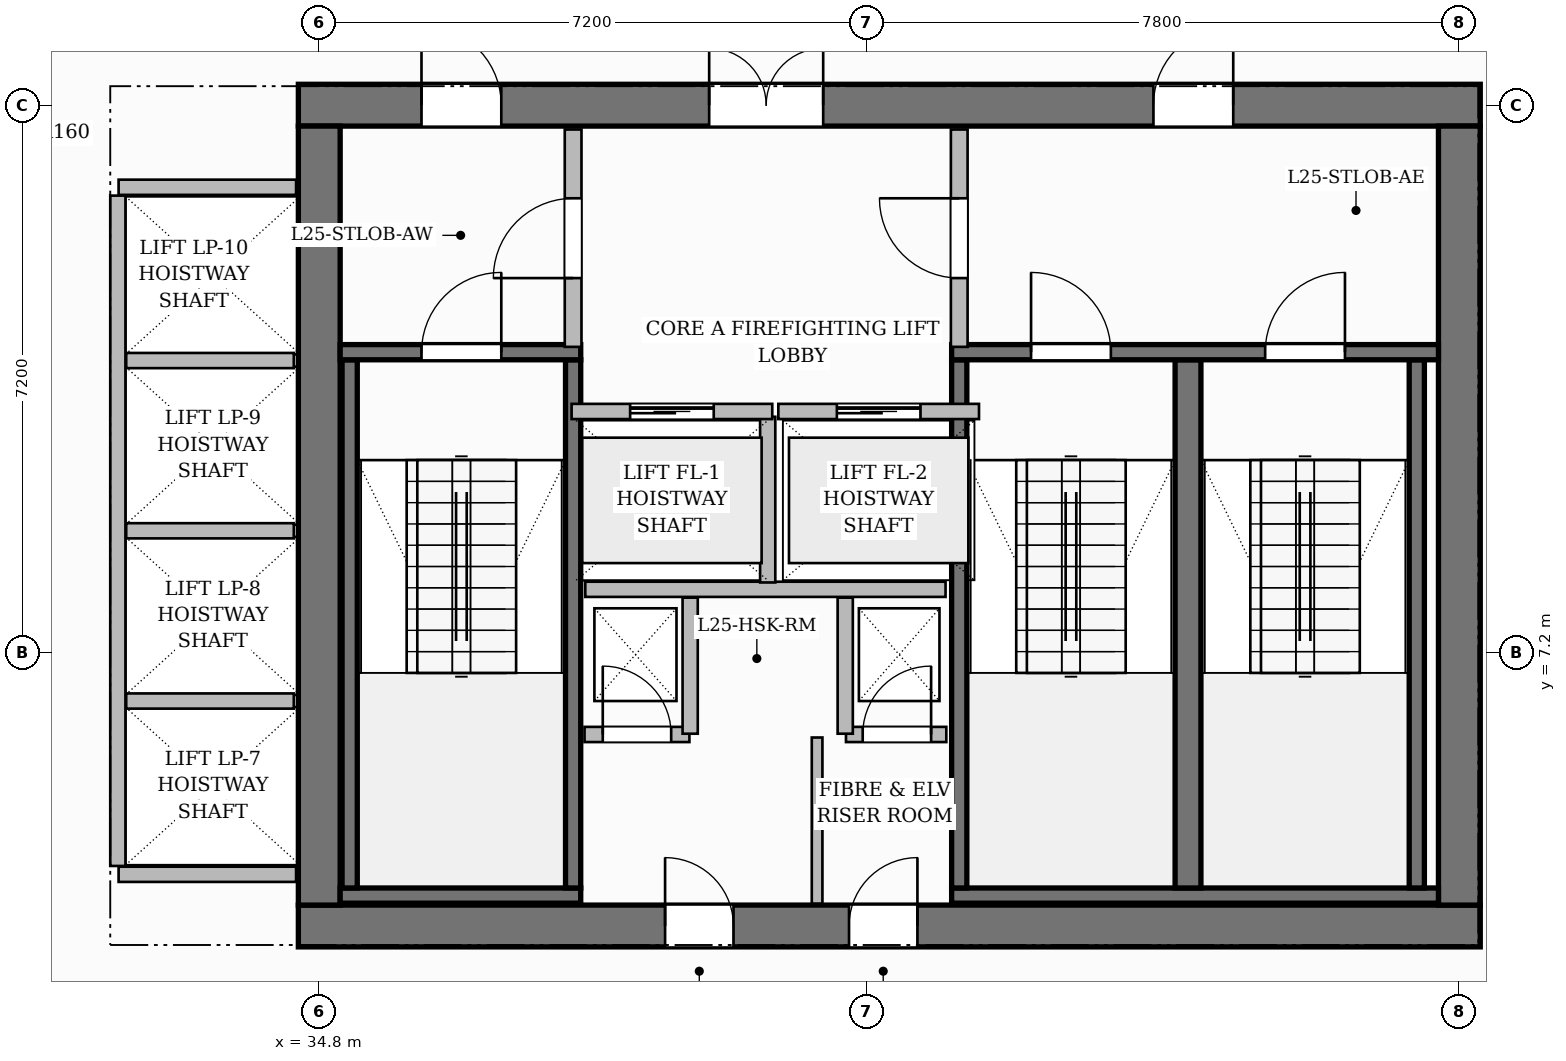
"""IFC4 building model, lengths in metres.
Left out: names, types, materials, properties, quantities, classifications, styles, units other than length and angle.
Written with IfcOpenShell. Run it as: python <this file> out.ifc"""

import sys

from ifc_helpers import new_model, si_unit, direction, frame, frame_2d, origin, place, context, subcontext, project, spatial, rectangle, extrude, source, transform, mapped, element, fill, save


model = new_model("IFC4")
c1 = context("Model", 3, precision=1e-05, world=origin(), true_north=direction((0.0, 1.0)))
c2 = subcontext(c1, "Body", "Model", "MODEL_VIEW")
j1 = project(units=[si_unit("LENGTHUNIT", "METRE"), si_unit("PLANEANGLEUNIT", "RADIAN")], contexts=[c1])
p1 = place(None, origin())
s1 = spatial("IfcSite", under=j1, at=p1, CompositionType="ELEMENT")
p2 = place(p1, origin())
s2 = spatial("IfcBuilding", under=s1, at=p2, CompositionType="ELEMENT")
p3 = place(p2, frame((0.0, 0.0, 102.7)))
s3 = spatial("IfcBuildingStorey", under=s2, at=p3, CompositionType="ELEMENT", Elevation=102.7)
p4 = place(p3, frame((34.525, 3.6, 0.0), z_axis=(0.0, 0.0, 1.0), x_axis=(1.0, 0.0, 0.0)))
e1 = element("IfcWall", 1, at=p4, inside=s3, PredefinedType="SHEAR", context=c2, shape_type="SweptSolid", body=[
    extrude(rectangle(XDim=15.55, YDim=0.55, at=frame_2d((7.775, 0.0))), origin(), (0.0, 0.0, 1.0), 3.7),
])
p5 = place(p4, frame((4.825, 0.0, 0.0)))
e2 = element("IfcOpeningElement", 2, at=p5, cuts=e1, PredefinedType="OPENING", context=c2, shape_type="SweptSolid", body=[
    extrude(rectangle(XDim=0.9, YDim=2.1, at=frame_2d((0.45, 1.05))), frame((0.0, 0.285, 0.0), z_axis=(0.0, -1.0, 0.0), x_axis=(1.0, 0.0, 0.0)), (0.0, 0.0, 1.0), 0.57),
])
p6 = place(p4, frame((7.245, 0.0, 0.0)))
e3 = element("IfcOpeningElement", 3, at=p6, cuts=e1, PredefinedType="OPENING", context=c2, shape_type="SweptSolid", body=[
    extrude(rectangle(XDim=0.9, YDim=2.1, at=frame_2d((0.45, 1.05))), frame((0.0, 0.285, 0.0), z_axis=(0.0, -1.0, 0.0), x_axis=(1.0, 0.0, 0.0)), (0.0, 0.0, 1.0), 0.57),
])
p7 = place(p3, frame((34.525, 14.4, 0.0), z_axis=(0.0, 0.0, 1.0), x_axis=(1.0, 0.0, 0.0)))
e4 = element("IfcWall", 4, at=p7, inside=s3, PredefinedType="SHEAR", context=c2, shape_type="SweptSolid", body=[
    extrude(rectangle(XDim=15.55, YDim=0.55, at=frame_2d((7.775, 0.0))), origin(), (0.0, 0.0, 1.0), 3.7),
])
p8 = place(p7, frame((5.405, 0.0, 0.0)))
e5 = element("IfcOpeningElement", 5, at=p8, cuts=e4, PredefinedType="OPENING", context=c2, shape_type="SweptSolid", body=[
    extrude(rectangle(XDim=1.5, YDim=2.2, at=frame_2d((0.75, 1.1))), frame((0.0, 0.285, 0.0), z_axis=(0.0, -1.0, 0.0), x_axis=(1.0, 0.0, 0.0)), (0.0, 0.0, 1.0), 0.57),
])
p9 = place(p7, frame((1.62, 0.0, 0.0)))
e6 = element("IfcOpeningElement", 6, at=p9, cuts=e4, PredefinedType="OPENING", context=c2, shape_type="SweptSolid", body=[
    extrude(rectangle(XDim=1.05, YDim=2.15, at=frame_2d((0.525, 1.075))), frame((0.0, 0.285, 0.0), z_axis=(0.0, -1.0, 0.0), x_axis=(1.0, 0.0, 0.0)), (0.0, 0.0, 1.0), 0.57),
])
p10 = place(p7, frame((11.25, 0.0, 0.0)))
e7 = element("IfcOpeningElement", 7, at=p10, cuts=e4, PredefinedType="OPENING", context=c2, shape_type="SweptSolid", body=[
    extrude(rectangle(XDim=1.05, YDim=2.15, at=frame_2d((0.525, 1.075))), frame((0.0, 0.285, 0.0), z_axis=(0.0, -1.0, 0.0), x_axis=(1.0, 0.0, 0.0)), (0.0, 0.0, 1.0), 0.57),
])
for number, where, z_axis, x_axis in (
    (8, (34.8, 3.875, 0.0), (0.0, 0.0, 1.0), (0.0, 1.0, 0.0)),
    (9, (49.8, 3.875, 0.0), (0.0, 0.0, 1.0), (0.0, 1.0, 0.0)),
):
    element("IfcWall", number, at=place(p3, frame(where, z_axis=z_axis, x_axis=x_axis)), inside=s3, PredefinedType="SHEAR", context=c2, shape_type="SweptSolid", body=[
        extrude(rectangle(XDim=10.25, YDim=0.55, at=frame_2d((5.125, 0.0))), origin(), (0.0, 0.0, 1.0), 3.7),
    ])
p11 = place(p3, frame((35.075, 4.0, 0.0), z_axis=(0.0, 0.0, 1.0), x_axis=(1.0, 0.0, 0.0)))
e10 = element("IfcWall", 10, at=p11, inside=s3, PredefinedType="SHEAR", context=c2, shape_type="SweptSolid", body=[
    extrude(rectangle(XDim=3.165, YDim=0.2, at=frame_2d((1.583, 0.0))), origin(), (0.0, 0.0, 1.0), 3.7),
])
for number, where, z_axis, x_axis in (
    (11, (35.2, 4.1, 0.0), (0.0, 0.0, 1.0), (0.0, 1.0, 0.0)),
    (12, (38.14, 4.1, 0.0), (0.0, 0.0, 1.0), (0.0, 1.0, 0.0)),
):
    element("IfcWall", number, at=place(p3, frame(where, z_axis=z_axis, x_axis=x_axis)), inside=s3, PredefinedType="SHEAR", context=c2, shape_type="SweptSolid", body=[
        extrude(rectangle(XDim=6.95, YDim=0.2, at=frame_2d((3.475, 0.0))), origin(), (0.0, 0.0, 1.0), 3.7),
    ])
p12 = place(p3, frame((35.075, 11.15, 0.0), z_axis=(0.0, 0.0, 1.0), x_axis=(1.0, 0.0, 0.0)))
e13 = element("IfcWall", 13, at=p12, inside=s3, PredefinedType="SHEAR", context=c2, shape_type="SweptSolid", body=[
    extrude(rectangle(XDim=3.165, YDim=0.2, at=frame_2d((1.583, 0.0))), origin(), (0.0, 0.0, 1.0), 3.7),
])
p13 = place(p12, frame((1.07, 0.0, 0.0)))
e14 = element("IfcOpeningElement", 14, at=p13, cuts=e13, PredefinedType="OPENING", context=c2, shape_type="SweptSolid", body=[
    extrude(rectangle(XDim=1.05, YDim=2.2, at=frame_2d((0.525, 1.1))), frame((0.0, 0.11, 0.0), z_axis=(0.0, -1.0, 0.0), x_axis=(1.0, 0.0, 0.0)), (0.0, 0.0, 1.0), 0.22),
])
p14 = place(p3, frame((43.12, 4.0, 0.0), z_axis=(0.0, 0.0, 1.0), x_axis=(1.0, 0.0, 0.0)))
e15 = element("IfcWall", 15, at=p14, inside=s3, PredefinedType="SHEAR", context=c2, shape_type="SweptSolid", body=[
    extrude(rectangle(XDim=6.405, YDim=0.2, at=frame_2d((3.202, 0.0))), origin(), (0.0, 0.0, 1.0), 3.7),
])
p15 = place(p3, frame((43.22, 4.1, 0.0), z_axis=(0.0, 0.0, 1.0), x_axis=(0.0, 1.0, 0.0)))
e16 = element("IfcWall", 16, at=p15, inside=s3, PredefinedType="SHEAR", context=c2, shape_type="SweptSolid", body=[
    extrude(rectangle(XDim=6.95, YDim=0.2, at=frame_2d((3.475, 0.0))), origin(), (0.0, 0.0, 1.0), 3.7),
])
p16 = place(p3, frame((46.23, 4.1, 0.0), z_axis=(0.0, 0.0, 1.0), x_axis=(0.0, 1.0, 0.0)))
e17 = element("IfcWall", 17, at=p16, inside=s3, PredefinedType="SHEAR", context=c2, shape_type="SweptSolid", body=[
    extrude(rectangle(XDim=6.95, YDim=0.34, at=frame_2d((3.475, 0.0))), origin(), (0.0, 0.0, 1.0), 3.7),
])
p17 = place(p3, frame((49.24, 4.1, 0.0), z_axis=(0.0, 0.0, 1.0), x_axis=(0.0, 1.0, 0.0)))
e18 = element("IfcWall", 18, at=p17, inside=s3, PredefinedType="SHEAR", context=c2, shape_type="SweptSolid", body=[
    extrude(rectangle(XDim=6.95, YDim=0.2, at=frame_2d((3.475, 0.0))), origin(), (0.0, 0.0, 1.0), 3.7),
])
p18 = place(p3, frame((43.12, 11.15, 0.0), z_axis=(0.0, 0.0, 1.0), x_axis=(1.0, 0.0, 0.0)))
e19 = element("IfcWall", 19, at=p18, inside=s3, PredefinedType="SHEAR", context=c2, shape_type="SweptSolid", body=[
    extrude(rectangle(XDim=6.405, YDim=0.2, at=frame_2d((3.202, 0.0))), origin(), (0.0, 0.0, 1.0), 3.7),
])
p19 = place(p18, frame((1.045, 0.0, 0.0)))
e20 = element("IfcOpeningElement", 20, at=p19, cuts=e19, PredefinedType="OPENING", context=c2, shape_type="SweptSolid", body=[
    extrude(rectangle(XDim=1.05, YDim=2.2, at=frame_2d((0.525, 1.1))), frame((0.0, 0.11, 0.0), z_axis=(0.0, -1.0, 0.0), x_axis=(1.0, 0.0, 0.0)), (0.0, 0.0, 1.0), 0.22),
])
p20 = place(p18, frame((4.125, 0.0, 0.0)))
e21 = element("IfcOpeningElement", 21, at=p20, cuts=e19, PredefinedType="OPENING", context=c2, shape_type="SweptSolid", body=[
    extrude(rectangle(XDim=1.05, YDim=2.2, at=frame_2d((0.525, 1.1))), frame((0.0, 0.11, 0.0), z_axis=(0.0, -1.0, 0.0), x_axis=(1.0, 0.0, 0.0)), (0.0, 0.0, 1.0), 0.22),
])
p21 = place(p3, frame((38.3, 8.03, 0.0), z_axis=(0.0, 0.0, 1.0), x_axis=(1.0, 0.0, 0.0)))
e22 = element("IfcWall", 22, at=p21, inside=s3, PredefinedType="PARTITIONING", context=c2, shape_type="SweptSolid", body=[
    extrude(rectangle(XDim=4.74, YDim=0.2, at=frame_2d((2.37, 0.0))), origin(), (0.0, 0.0, 1.0), 3.4),
])
p22 = place(p3, frame((40.7, 8.12, 0.0), z_axis=(0.0, 0.0, 1.0), x_axis=(0.0, 1.0, 0.0)))
e23 = element("IfcWall", 23, at=p22, inside=s3, PredefinedType="PARTITIONING", context=c2, shape_type="SweptSolid", body=[
    extrude(rectangle(XDim=2.18, YDim=0.2, at=frame_2d((1.09, 0.0))), origin(), (0.0, 0.0, 1.0), 3.4),
])
p23 = place(p3, frame((38.14, 11.22, 0.0), z_axis=(0.0, 0.0, 1.0), x_axis=(0.0, 1.0, 0.0)))
e24 = element("IfcWall", 24, at=p23, inside=s3, PredefinedType="PARTITIONING", context=c2, shape_type="SweptSolid", body=[
    extrude(rectangle(XDim=2.86, YDim=0.22, at=frame_2d((1.43, 0.0))), origin(), (0.0, 0.0, 1.0), 3.4),
])
p24 = place(p23, frame((0.905, 0.0, 0.0)))
e25 = element("IfcOpeningElement", 25, at=p24, cuts=e24, PredefinedType="OPENING", context=c2, shape_type="SweptSolid", body=[
    extrude(rectangle(XDim=1.05, YDim=2.15, at=frame_2d((0.525, 1.075))), frame((0.0, 0.12, 0.0), z_axis=(0.0, -1.0, 0.0), x_axis=(1.0, 0.0, 0.0)), (0.0, 0.0, 1.0), 0.24),
])
p25 = place(p3, frame((43.22, 11.22, 0.0), z_axis=(0.0, 0.0, 1.0), x_axis=(0.0, 1.0, 0.0)))
e26 = element("IfcWall", 26, at=p25, inside=s3, PredefinedType="PARTITIONING", context=c2, shape_type="SweptSolid", body=[
    extrude(rectangle(XDim=2.86, YDim=0.22, at=frame_2d((1.43, 0.0))), origin(), (0.0, 0.0, 1.0), 3.4),
])
p26 = place(p25, frame((0.905, 0.0, 0.0)))
e27 = element("IfcOpeningElement", 27, at=p26, cuts=e26, PredefinedType="OPENING", context=c2, shape_type="SweptSolid", body=[
    extrude(rectangle(XDim=1.05, YDim=2.15, at=frame_2d((0.525, 1.075))), frame((0.0, 0.12, 0.0), z_axis=(0.0, -1.0, 0.0), x_axis=(1.0, 0.0, 0.0)), (0.0, 0.0, 1.0), 0.24),
])
p27 = place(p3, frame((38.29, 6.12, 0.0), z_axis=(0.0, 0.0, 1.0), x_axis=(1.0, 0.0, 0.0)))
e28 = element("IfcWall", 28, at=p27, inside=s3, PredefinedType="PARTITIONING", context=c2, shape_type="SweptSolid", body=[
    extrude(rectangle(XDim=1.38, YDim=0.2, at=frame_2d((0.69, 0.0))), origin(), (0.0, 0.0, 1.0), 3.4),
])
p28 = place(p27, frame((0.24, 0.0, 0.0)))
e29 = element("IfcOpeningElement", 29, at=p28, cuts=e28, PredefinedType="OPENING", context=c2, shape_type="SweptSolid", body=[
    extrude(rectangle(XDim=0.9, YDim=2.1, at=frame_2d((0.45, 1.05))), frame((0.0, 0.11, 0.0), z_axis=(0.0, -1.0, 0.0), x_axis=(1.0, 0.0, 0.0)), (0.0, 0.0, 1.0), 0.22),
])
p29 = place(p3, frame((39.68, 6.13, 0.0), z_axis=(0.0, 0.0, 1.0), x_axis=(0.0, 1.0, 0.0)))
e30 = element("IfcWall", 30, at=p29, inside=s3, PredefinedType="PARTITIONING", context=c2, shape_type="SweptSolid", body=[
    extrude(rectangle(XDim=1.79, YDim=0.2, at=frame_2d((0.895, 0.0))), origin(), (0.0, 0.0, 1.0), 3.4),
])
p30 = place(p3, frame((41.73, 6.12, 0.0), z_axis=(0.0, 0.0, 1.0), x_axis=(1.0, 0.0, 0.0)))
e31 = element("IfcWall", 31, at=p30, inside=s3, PredefinedType="PARTITIONING", context=c2, shape_type="SweptSolid", body=[
    extrude(rectangle(XDim=1.32, YDim=0.2, at=frame_2d((0.66, 0.0))), origin(), (0.0, 0.0, 1.0), 3.4),
])
p31 = place(p30, frame((0.22, 0.0, 0.0)))
e32 = element("IfcOpeningElement", 32, at=p31, cuts=e31, PredefinedType="OPENING", context=c2, shape_type="SweptSolid", body=[
    extrude(rectangle(XDim=0.9, YDim=2.1, at=frame_2d((0.45, 1.05))), frame((0.0, 0.11, 0.0), z_axis=(0.0, -1.0, 0.0), x_axis=(1.0, 0.0, 0.0)), (0.0, 0.0, 1.0), 0.22),
])
p32 = place(p3, frame((41.72, 6.13, 0.0), z_axis=(0.0, 0.0, 1.0), x_axis=(0.0, 1.0, 0.0)))
e33 = element("IfcWall", 33, at=p32, inside=s3, PredefinedType="PARTITIONING", context=c2, shape_type="SweptSolid", body=[
    extrude(rectangle(XDim=1.79, YDim=0.2, at=frame_2d((0.895, 0.0))), origin(), (0.0, 0.0, 1.0), 3.4),
])
p33 = place(p3, frame((41.35, 3.895, 0.0), z_axis=(0.0, 0.0, 1.0), x_axis=(0.0, 1.0, 0.0)))
e34 = element("IfcWall", 34, at=p33, inside=s3, PredefinedType="PARTITIONING", context=c2, shape_type="SweptSolid", body=[
    extrude(rectangle(XDim=2.185, YDim=0.14, at=frame_2d((1.093, 0.0))), origin(), (0.0, 0.0, 1.0), 3.4),
])
for number, where, z_axis, x_axis in (
    (35, (32.16, 4.28, 0.0), (0.0, 0.0, 1.0), (1.0, 0.0, 0.0)),
    (36, (32.16, 13.32, 0.0), (0.0, 0.0, 1.0), (1.0, 0.0, 0.0)),
):
    element("IfcWall", number, at=place(p3, frame(where, z_axis=z_axis, x_axis=x_axis)), inside=s3, PredefinedType="PARTITIONING", context=c2, shape_type="SweptSolid", body=[
        extrude(rectangle(XDim=2.335, YDim=0.2, at=frame_2d((1.167, 0.0))), origin(), (0.0, 0.0, 1.0), 3.4),
    ])
p34 = place(p3, frame((32.15, 4.39, 0.0), z_axis=(0.0, 0.0, 1.0), x_axis=(0.0, 1.0, 0.0)))
e37 = element("IfcWall", 37, at=p34, inside=s3, PredefinedType="PARTITIONING", context=c2, shape_type="SweptSolid", body=[
    extrude(rectangle(XDim=8.82, YDim=0.2, at=frame_2d((4.41, 0.0))), origin(), (0.0, 0.0, 1.0), 3.4),
])
for number, where, z_axis, x_axis in (
    (38, (32.26, 6.56, 0.0), (0.0, 0.0, 1.0), (1.0, 0.0, 0.0)),
    (39, (32.26, 8.8, 0.0), (0.0, 0.0, 1.0), (1.0, 0.0, 0.0)),
    (40, (32.26, 11.04, 0.0), (0.0, 0.0, 1.0), (1.0, 0.0, 0.0)),
):
    element("IfcWall", number, at=place(p3, frame(where, z_axis=z_axis, x_axis=x_axis)), inside=s3, PredefinedType="PARTITIONING", context=c2, shape_type="SweptSolid", body=[
        extrude(rectangle(XDim=2.205, YDim=0.2, at=frame_2d((1.103, 0.0))), origin(), (0.0, 0.0, 1.0), 3.4),
    ])
p35 = place(p3, frame((38.12, 10.37, 0.0), z_axis=(0.0, 0.0, 1.0), x_axis=(1.0, 0.0, 0.0)))
e41 = element("IfcWall", 41, at=p35, inside=s3, PredefinedType="PARTITIONING", context=c2, shape_type="SweptSolid", body=[
    extrude(rectangle(XDim=2.64, YDim=0.2, at=frame_2d((1.32, 0.0))), origin(), (0.0, 0.0, 1.0), 3.4),
])
p36 = place(p35, frame((0.77, 0.0, 0.0)))
e42 = element("IfcOpeningElement", 42, at=p36, cuts=e41, PredefinedType="OPENING", context=c2, shape_type="SweptSolid", body=[
    extrude(rectangle(XDim=1.1, YDim=2.2, at=frame_2d((0.55, 1.1))), frame((0.0, 0.11, 0.0), z_axis=(0.0, -1.0, 0.0), x_axis=(1.0, 0.0, 0.0)), (0.0, 0.0, 1.0), 0.22),
])
p37 = place(p3, frame((40.84, 10.37, 0.0), z_axis=(0.0, 0.0, 1.0), x_axis=(1.0, 0.0, 0.0)))
e43 = element("IfcWall", 43, at=p37, inside=s3, PredefinedType="PARTITIONING", context=c2, shape_type="SweptSolid", body=[
    extrude(rectangle(XDim=2.64, YDim=0.2, at=frame_2d((1.32, 0.0))), origin(), (0.0, 0.0, 1.0), 3.4),
])
p38 = place(p37, frame((0.77, 0.0, 0.0)))
e44 = element("IfcOpeningElement", 44, at=p38, cuts=e43, PredefinedType="OPENING", context=c2, shape_type="SweptSolid", body=[
    extrude(rectangle(XDim=1.1, YDim=2.2, at=frame_2d((0.55, 1.1))), frame((0.0, 0.11, 0.0), z_axis=(0.0, -1.0, 0.0), x_axis=(1.0, 0.0, 0.0)), (0.0, 0.0, 1.0), 0.22),
])
m1 = source(origin(), c2, "Body", "SweptSolid", [
    extrude(rectangle(XDim=1.05, YDim=2.2, at=frame_2d((0.525, 1.1))), frame((0.0, 0.025, 0.0), z_axis=(0.0, -1.0, 0.0), x_axis=(1.0, 0.0, 0.0)), (0.0, 0.0, 1.0), 0.05),
])
p39 = place(p13, origin())
e45 = element("IfcDoor", 45, at=p39, inside=s3, OperationType="SINGLE_SWING_RIGHT", PredefinedType="DOOR", context=c2, shape_type="MappedRepresentation", body=[
    mapped(m1, transform((0.0, 0.0, 0.0), scale=1.0)),
])
fill(e14, e45)
p40 = place(p19, origin())
e46 = element("IfcDoor", 46, at=p40, inside=s3, OperationType="SINGLE_SWING_LEFT", PredefinedType="DOOR", context=c2, shape_type="MappedRepresentation", body=[
    mapped(m1, transform((0.0, 0.0, 0.0), scale=1.0)),
])
fill(e20, e46)
p41 = place(p20, origin())
e47 = element("IfcDoor", 47, at=p41, inside=s3, OperationType="SINGLE_SWING_RIGHT", PredefinedType="DOOR", context=c2, shape_type="MappedRepresentation", body=[
    mapped(m1, transform((0.0, 0.0, 0.0), scale=1.0)),
])
fill(e21, e47)
m2 = source(origin(), c2, "Body", "SweptSolid", [
    extrude(rectangle(XDim=1.05, YDim=2.15, at=frame_2d((0.525, 1.075))), frame((0.0, 0.025, 0.0), z_axis=(0.0, -1.0, 0.0), x_axis=(1.0, 0.0, 0.0)), (0.0, 0.0, 1.0), 0.05),
])
p42 = place(p24, origin())
e48 = element("IfcDoor", 48, at=p42, inside=s3, OperationType="SINGLE_SWING_LEFT", PredefinedType="DOOR", context=c2, shape_type="MappedRepresentation", body=[
    mapped(m2, transform((0.0, 0.0, 0.0), scale=1.0)),
])
fill(e25, e48)
p43 = place(p26, origin())
e49 = element("IfcDoor", 49, at=p43, inside=s3, OperationType="SINGLE_SWING_RIGHT", PredefinedType="DOOR", context=c2, shape_type="MappedRepresentation", body=[
    mapped(m2, transform((0.0, 0.0, 0.0), scale=1.0)),
])
fill(e27, e49)
m3 = source(origin(), c2, "Body", "SweptSolid", [
    extrude(rectangle(XDim=1.5, YDim=2.2, at=frame_2d((0.75, 1.1))), frame((0.0, 0.025, 0.0), z_axis=(0.0, -1.0, 0.0), x_axis=(1.0, 0.0, 0.0)), (0.0, 0.0, 1.0), 0.05),
])
p44 = place(p8, origin())
e50 = element("IfcDoor", 50, at=p44, inside=s3, OperationType="DOUBLE_DOOR_SINGLE_SWING", PredefinedType="DOOR", context=c2, shape_type="MappedRepresentation", body=[
    mapped(m3, transform((0.0, 0.0, 0.0), scale=1.0)),
])
fill(e5, e50)
p45 = place(p9, origin())
e51 = element("IfcDoor", 51, at=p45, inside=s3, OperationType="SINGLE_SWING_LEFT", PredefinedType="DOOR", context=c2, shape_type="MappedRepresentation", body=[
    mapped(m2, transform((0.0, 0.0, 0.0), scale=1.0)),
])
fill(e6, e51)
p46 = place(p10, origin())
e52 = element("IfcDoor", 52, at=p46, inside=s3, OperationType="SINGLE_SWING_RIGHT", PredefinedType="DOOR", context=c2, shape_type="MappedRepresentation", body=[
    mapped(m2, transform((0.0, 0.0, 0.0), scale=1.0)),
])
fill(e7, e52)
m4 = source(origin(), c2, "Body", "SweptSolid", [
    extrude(rectangle(XDim=0.9, YDim=2.1, at=frame_2d((0.45, 1.05))), frame((0.0, 0.025, 0.0), z_axis=(0.0, -1.0, 0.0), x_axis=(1.0, 0.0, 0.0)), (0.0, 0.0, 1.0), 0.05),
])
p47 = place(p28, origin())
e53 = element("IfcDoor", 53, at=p47, inside=s3, OperationType="SINGLE_SWING_LEFT", PredefinedType="DOOR", context=c2, shape_type="MappedRepresentation", body=[
    mapped(m4, transform((0.0, 0.0, 0.0), scale=1.0)),
])
fill(e29, e53)
p48 = place(p31, origin())
e54 = element("IfcDoor", 54, at=p48, inside=s3, OperationType="SINGLE_SWING_RIGHT", PredefinedType="DOOR", context=c2, shape_type="MappedRepresentation", body=[
    mapped(m4, transform((0.0, 0.0, 0.0), scale=1.0)),
])
fill(e32, e54)
p49 = place(p5, origin())
e55 = element("IfcDoor", 55, at=p49, inside=s3, OperationType="SINGLE_SWING_LEFT", PredefinedType="DOOR", context=c2, shape_type="MappedRepresentation", body=[
    mapped(m4, transform((0.0, 0.0, 0.0), scale=1.0)),
])
fill(e2, e55)
p50 = place(p6, origin())
e56 = element("IfcDoor", 56, at=p50, inside=s3, OperationType="SINGLE_SWING_RIGHT", PredefinedType="DOOR", context=c2, shape_type="MappedRepresentation", body=[
    mapped(m4, transform((0.0, 0.0, 0.0), scale=1.0)),
])
fill(e3, e56)
m5 = source(origin(), c2, "Body", "SweptSolid", [
    extrude(rectangle(XDim=1.1, YDim=2.2, at=frame_2d((0.55, 1.1))), frame((0.0, 0.025, 0.0), z_axis=(0.0, -1.0, 0.0), x_axis=(1.0, 0.0, 0.0)), (0.0, 0.0, 1.0), 0.05),
])
p51 = place(p36, origin())
e57 = element("IfcDoor", 57, at=p51, inside=s3, OperationType="SLIDING_TO_LEFT", PredefinedType="DOOR", context=c2, shape_type="MappedRepresentation", body=[
    mapped(m5, transform((0.0, 0.0, 0.0), scale=1.0)),
])
fill(e42, e57)
p52 = place(p38, origin())
e58 = element("IfcDoor", 58, at=p52, inside=s3, OperationType="SLIDING_TO_LEFT", PredefinedType="DOOR", context=c2, shape_type="MappedRepresentation", body=[
    mapped(m5, transform((0.0, 0.0, 0.0), scale=1.0)),
])
fill(e44, e58)
save(model, sys.argv[1])
